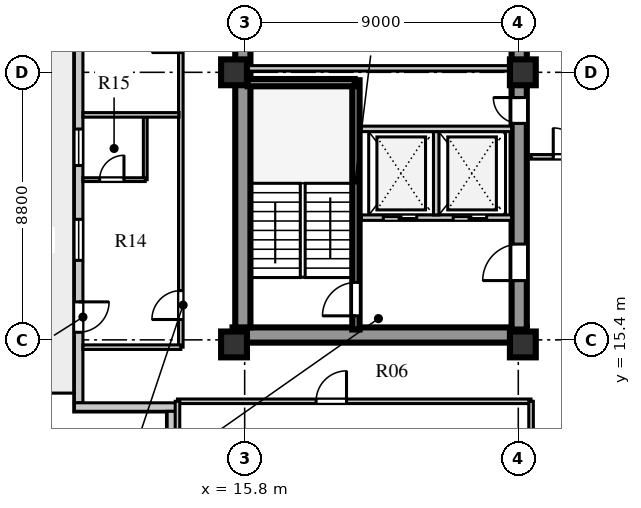
"""IFC4 building model, lengths in metres.
Left out: names, types, materials, properties, quantities, classifications, styles, units other than length and angle.
Written with IfcOpenShell. Run it as: python <this file> out.ifc"""

import sys

from ifc_helpers import new_model, si_unit, direction, frame, frame_2d, origin, origin_2d, place, context, subcontext, project, spatial, rectangle, extrude, element, fill, save


model = new_model("IFC4")
c1 = context("Model", 3, precision=1e-05, world=origin(), true_north=direction((0.0, 1.0)))
c2 = subcontext(c1, "Body", "Model", "MODEL_VIEW")
j1 = project(units=[si_unit("LENGTHUNIT", "METRE"), si_unit("PLANEANGLEUNIT", "RADIAN")], contexts=[c1])
p1 = place(None, origin())
s1 = spatial("IfcSite", under=j1, at=p1, CompositionType="ELEMENT")
p2 = place(p1, origin())
s2 = spatial("IfcBuilding", under=s1, at=p2, CompositionType="ELEMENT")
p3 = place(p2, frame((0.0, 0.0, 127.1)))
s3 = spatial("IfcBuildingStorey", under=s2, at=p3, CompositionType="ELEMENT", Elevation=127.1)
p4 = place(p3, frame((15.4, 15.56, 0.0), z_axis=(0.0, 0.0, 1.0), x_axis=(1.0, 0.0, 0.0)))
e1 = element("IfcWall", 1, at=p4, inside=s3, PredefinedType="SHEAR", context=c2, shape_type="SweptSolid", body=[
    extrude(rectangle(XDim=9.68, YDim=0.5, at=frame_2d((4.84, 0.0))), origin(), (0.0, 0.0, 1.0), 3.6),
])
p5 = place(p3, frame((15.74, 15.81, 0.0), z_axis=(0.0, 0.0, 1.0), x_axis=(0.0, 1.0, 0.0)))
e2 = element("IfcWall", 2, at=p5, inside=s3, PredefinedType="SHEAR", context=c2, shape_type="SweptSolid", body=[
    extrude(rectangle(XDim=25.63, YDim=0.5, at=frame_2d((12.815, 0.0))), origin(), (0.0, 0.0, 1.0), 3.6),
])
p6 = place(p3, frame((24.83, 15.74, 0.0), z_axis=(0.0, 0.0, 1.0), x_axis=(0.0, 1.0, 0.0)))
e3 = element("IfcWall", 3, at=p6, inside=s3, PredefinedType="SHEAR", context=c2, shape_type="SweptSolid", body=[
    extrude(rectangle(XDim=25.76, YDim=0.5, at=frame_2d((12.88, 0.0))), origin(), (0.0, 0.0, 1.0), 3.6),
])
p7 = place(p6, frame((1.61, 0.0, 0.0)))
e4 = element("IfcOpeningElement", 4, at=p7, cuts=e3, PredefinedType="OPENING", context=c2, shape_type="SweptSolid", body=[
    extrude(rectangle(XDim=1.2, YDim=2.1, at=frame_2d((0.6, 1.05))), frame((0.0, 0.26, 0.0), z_axis=(0.0, -1.0, 0.0), x_axis=(1.0, 0.0, 0.0)), (0.0, 0.0, 1.0), 0.52),
])
p8 = place(p6, frame((6.78, 0.0, 0.0)))
e5 = element("IfcOpeningElement", 5, at=p8, cuts=e3, PredefinedType="OPENING", context=c2, shape_type="SweptSolid", body=[
    extrude(rectangle(XDim=0.85, YDim=2.06, at=frame_2d((0.425, 1.03))), frame((0.0, 0.26, 0.0), z_axis=(0.0, -1.0, 0.0), x_axis=(1.0, 0.0, 0.0)), (0.0, 0.0, 1.0), 0.52),
])
p9 = place(p6, frame((12.11, 0.0, 0.0)))
e6 = element("IfcOpeningElement", 6, at=p9, cuts=e3, PredefinedType="OPENING", context=c2, shape_type="SweptSolid", body=[
    extrude(rectangle(XDim=1.5, YDim=2.12, at=frame_2d((0.75, 1.06))), frame((0.0, 0.26, 0.0), z_axis=(0.0, -1.0, 0.0), x_axis=(1.0, 0.0, 0.0)), (0.0, 0.0, 1.0), 0.52),
])
p10 = place(p6, frame((20.11, 0.0, 0.0)))
e7 = element("IfcOpeningElement", 7, at=p10, cuts=e3, PredefinedType="OPENING", context=c2, shape_type="SweptSolid", body=[
    extrude(rectangle(XDim=1.2, YDim=2.12, at=frame_2d((0.6, 1.06))), frame((0.0, 0.26, 0.0), z_axis=(0.0, -1.0, 0.0), x_axis=(1.0, 0.0, 0.0)), (0.0, 0.0, 1.0), 0.52),
])
p11 = place(p6, frame((24.01, 0.0, 0.0)))
e8 = element("IfcOpeningElement", 8, at=p11, cuts=e3, PredefinedType="OPENING", context=c2, shape_type="SweptSolid", body=[
    extrude(rectangle(XDim=0.95, YDim=2.1, at=frame_2d((0.475, 1.05))), frame((0.0, 0.26, 0.0), z_axis=(0.0, -1.0, 0.0), x_axis=(1.0, 0.0, 0.0)), (0.0, 0.0, 1.0), 0.52),
])
for number, where, z_axis, x_axis in (
    (9, (15.45, 15.25, 0.0), (0.0, 0.0, 1.0), (1.0, 0.0, 0.0)),
    (10, (15.45, 24.2, 0.0), (0.0, 0.0, 1.0), (1.0, 0.0, 0.0)),
    (11, (24.95, 15.25, 0.0), (0.0, 0.0, 1.0), (1.0, 0.0, 0.0)),
    (12, (24.95, 24.2, 0.0), (0.0, 0.0, 1.0), (1.0, 0.0, 0.0)),
):
    element("IfcColumn", number, at=place(p3, frame(where, z_axis=z_axis, x_axis=x_axis)), inside=s3, PredefinedType="COLUMN", context=c2, shape_type="SweptSolid", body=[
        extrude(rectangle(XDim=0.85, YDim=0.85, at=origin_2d()), origin(), (0.0, 0.0, 1.0), 3.6),
    ])
p12 = place(p3, frame((10.34, 43.87, 0.0), z_axis=(0.0, 0.0, 1.0), x_axis=(0.0, -1.0, 0.0)))
e13 = element("IfcWall", 13, at=p12, inside=s3, PredefinedType="STANDARD", context=c2, shape_type="SweptSolid", body=[
    extrude(rectangle(XDim=30.54, YDim=0.28, at=frame_2d((15.27, 0.0))), origin(), (0.0, 0.0, 1.0), 3.6),
])
p13 = place(p12, frame((27.22, 0.0, 0.0)))
e14 = element("IfcOpeningElement", 14, at=p13, cuts=e13, PredefinedType="OPENING", context=c2, shape_type="SweptSolid", body=[
    extrude(rectangle(XDim=1.0, YDim=2.05, at=frame_2d((0.5, 1.025))), frame((0.0, 0.15, 0.0), z_axis=(0.0, -1.0, 0.0), x_axis=(1.0, 0.0, 0.0)), (0.0, 0.0, 1.0), 0.3),
])
p14 = place(p12, frame((24.505, 0.0, 0.8)))
e15 = element("IfcOpeningElement", 15, at=p14, cuts=e13, PredefinedType="OPENING", context=c2, shape_type="SweptSolid", body=[
    extrude(rectangle(XDim=1.35, YDim=1.9, at=frame_2d((0.675, 0.95))), frame((0.0, 0.15, 0.0), z_axis=(0.0, -1.0, 0.0), x_axis=(1.0, 0.0, 0.0)), (0.0, 0.0, 1.0), 0.3),
])
p15 = place(p12, frame((21.535, 0.0, 0.8)))
e16 = element("IfcOpeningElement", 16, at=p15, cuts=e13, PredefinedType="OPENING", context=c2, shape_type="SweptSolid", body=[
    extrude(rectangle(XDim=1.2, YDim=1.75, at=frame_2d((0.6, 0.875))), frame((0.0, 0.15, 0.0), z_axis=(0.0, -1.0, 0.0), x_axis=(1.0, 0.0, 0.0)), (0.0, 0.0, 1.0), 0.3),
])
p16 = place(p12, frame((16.16, 0.0, 0.8)))
e17 = element("IfcOpeningElement", 17, at=p16, cuts=e13, PredefinedType="OPENING", context=c2, shape_type="SweptSolid", body=[
    extrude(rectangle(XDim=1.95, YDim=2.0, at=frame_2d((0.975, 1.0))), frame((0.0, 0.15, 0.0), z_axis=(0.0, -1.0, 0.0), x_axis=(1.0, 0.0, 0.0)), (0.0, 0.0, 1.0), 0.3),
])
p17 = place(p12, frame((11.535, 0.0, 0.8)))
e18 = element("IfcOpeningElement", 18, at=p17, cuts=e13, PredefinedType="OPENING", context=c2, shape_type="SweptSolid", body=[
    extrude(rectangle(XDim=1.2, YDim=1.75, at=frame_2d((0.6, 0.875))), frame((0.0, 0.15, 0.0), z_axis=(0.0, -1.0, 0.0), x_axis=(1.0, 0.0, 0.0)), (0.0, 0.0, 1.0), 0.3),
])
p18 = place(p12, frame((6.645, 0.0, 0.8)))
e19 = element("IfcOpeningElement", 19, at=p18, cuts=e13, PredefinedType="OPENING", context=c2, shape_type="SweptSolid", body=[
    extrude(rectangle(XDim=1.8, YDim=2.0, at=frame_2d((0.9, 1.0))), frame((0.0, 0.15, 0.0), z_axis=(0.0, -1.0, 0.0), x_axis=(1.0, 0.0, 0.0)), (0.0, 0.0, 1.0), 0.3),
])
p19 = place(p12, frame((2.325, 0.0, 0.8)))
e20 = element("IfcOpeningElement", 20, at=p19, cuts=e13, PredefinedType="OPENING", context=c2, shape_type="SweptSolid", body=[
    extrude(rectangle(XDim=1.2, YDim=1.75, at=frame_2d((0.6, 0.875))), frame((0.0, 0.15, 0.0), z_axis=(0.0, -1.0, 0.0), x_axis=(1.0, 0.0, 0.0)), (0.0, 0.0, 1.0), 0.3),
])
p20 = place(p3, frame((10.2, 13.19, 0.0), z_axis=(0.0, 0.0, 1.0), x_axis=(1.0, 0.0, 0.0)))
e21 = element("IfcWall", 21, at=p20, inside=s3, PredefinedType="STANDARD", context=c2, shape_type="SweptSolid", body=[
    extrude(rectangle(XDim=3.33, YDim=0.28, at=frame_2d((1.665, 0.0))), origin(), (0.0, 0.0, 1.0), 3.6),
])
p21 = place(p3, frame((13.39, 13.05, 0.0), z_axis=(0.0, 0.0, 1.0), x_axis=(0.0, -1.0, 0.0)))
e22 = element("IfcWall", 22, at=p21, inside=s3, PredefinedType="STANDARD", context=c2, shape_type="SweptSolid", body=[
    extrude(rectangle(XDim=2.77, YDim=0.28, at=frame_2d((1.385, 0.0))), origin(), (0.0, 0.0, 1.0), 3.6),
])
p22 = place(p3, frame((19.46, 15.74, 0.0), z_axis=(0.0, 0.0, 1.0), x_axis=(0.0, 1.0, 0.0)))
e23 = element("IfcWall", 23, at=p22, inside=s3, PredefinedType="SHEAR", context=c2, shape_type="SweptSolid", body=[
    extrude(rectangle(XDim=8.2, YDim=0.24, at=frame_2d((4.1, 0.0))), origin(), (0.0, 0.0, 1.0), 3.85),
])
p23 = place(p22, frame((0.45, 0.0, 0.0)))
e24 = element("IfcOpeningElement", 24, at=p23, cuts=e23, PredefinedType="OPENING", context=c2, shape_type="SweptSolid", body=[
    extrude(rectangle(XDim=1.1, YDim=2.1, at=frame_2d((0.55, 1.05))), frame((0.0, 0.13, 0.0), z_axis=(0.0, -1.0, 0.0), x_axis=(1.0, 0.0, 0.0)), (0.0, 0.0, 1.0), 0.26),
])
p24 = place(p3, frame((15.9, 23.86, 0.0), z_axis=(0.0, 0.0, 1.0), x_axis=(1.0, 0.0, 0.0)))
e25 = element("IfcWall", 25, at=p24, inside=s3, PredefinedType="SHEAR", context=c2, shape_type="SweptSolid", body=[
    extrude(rectangle(XDim=3.52, YDim=0.24, at=frame_2d((1.76, 0.0))), origin(), (0.0, 0.0, 1.0), 3.85),
])
p25 = place(p3, frame((19.64, 19.42, 0.0), z_axis=(0.0, 0.0, 1.0), x_axis=(1.0, 0.0, 0.0)))
e26 = element("IfcWall", 26, at=p25, inside=s3, PredefinedType="SOLIDWALL", context=c2, shape_type="SweptSolid", body=[
    extrude(rectangle(XDim=4.94, YDim=0.18, at=frame_2d((2.47, 0.0))), origin(), (0.0, 0.0, 1.0), 3.6),
])
p26 = place(p25, frame((0.72, 0.0, 0.0)))
e27 = element("IfcOpeningElement", 27, at=p26, cuts=e26, PredefinedType="OPENING", context=c2, shape_type="SweptSolid", body=[
    extrude(rectangle(XDim=1.1, YDim=2.1, at=frame_2d((0.55, 1.05))), frame((0.0, 0.1, 0.0), z_axis=(0.0, -1.0, 0.0), x_axis=(1.0, 0.0, 0.0)), (0.0, 0.0, 1.0), 0.2),
])
p27 = place(p25, frame((3.02, 0.0, 0.0)))
e28 = element("IfcOpeningElement", 28, at=p27, cuts=e26, PredefinedType="OPENING", context=c2, shape_type="SweptSolid", body=[
    extrude(rectangle(XDim=1.1, YDim=2.1, at=frame_2d((0.55, 1.05))), frame((0.0, 0.1, 0.0), z_axis=(0.0, -1.0, 0.0), x_axis=(1.0, 0.0, 0.0)), (0.0, 0.0, 1.0), 0.2),
])
p28 = place(p3, frame((22.1, 19.51, 0.0), z_axis=(0.0, 0.0, 1.0), x_axis=(0.0, 1.0, 0.0)))
e29 = element("IfcWall", 29, at=p28, inside=s3, PredefinedType="SOLIDWALL", context=c2, shape_type="SweptSolid", body=[
    extrude(rectangle(XDim=2.74, YDim=0.18, at=frame_2d((1.37, 0.0))), origin(), (0.0, 0.0, 1.0), 3.6),
])
p29 = place(p3, frame((19.64, 22.34, 0.0), z_axis=(0.0, 0.0, 1.0), x_axis=(1.0, 0.0, 0.0)))
e30 = element("IfcWall", 30, at=p29, inside=s3, PredefinedType="SOLIDWALL", context=c2, shape_type="SweptSolid", body=[
    extrude(rectangle(XDim=4.94, YDim=0.18, at=frame_2d((2.47, 0.0))), origin(), (0.0, 0.0, 1.0), 3.6),
])
p30 = place(p3, frame((15.9, 24.33, 0.0), z_axis=(0.0, 0.0, 1.0), x_axis=(1.0, 0.0, 0.0)))
e31 = element("IfcWall", 31, at=p30, inside=s3, PredefinedType="SOLIDWALL", context=c2, shape_type="SweptSolid", body=[
    extrude(rectangle(XDim=8.68, YDim=0.18, at=frame_2d((4.34, 0.0))), origin(), (0.0, 0.0, 1.0), 2.95),
])
p31 = place(p3, frame((25.22, 21.42, 0.0), z_axis=(0.0, 0.0, 1.0), x_axis=(1.0, 0.0, 0.0)))
e32 = element("IfcWall", 32, at=p31, inside=s3, PredefinedType="PARTITIONING", context=c2, shape_type="SweptSolid", body=[
    extrude(rectangle(XDim=15.6, YDim=0.15, at=frame_2d((7.8, 0.0))), origin(), (0.0, 0.0, 1.0), 3.2),
])
p32 = place(p31, frame((0.73, 0.0, 0.0)))
e33 = element("IfcOpeningElement", 33, at=p32, cuts=e32, PredefinedType="OPENING", context=c2, shape_type="SweptSolid", body=[
    extrude(rectangle(XDim=0.95, YDim=2.1, at=frame_2d((0.475, 1.05))), frame((0.0, 0.085, 0.0), z_axis=(0.0, -1.0, 0.0), x_axis=(1.0, 0.0, 0.0)), (0.0, 0.0, 1.0), 0.17),
])
p33 = place(p31, frame((5.23, 0.0, 0.0)))
e34 = element("IfcOpeningElement", 34, at=p33, cuts=e32, PredefinedType="OPENING", context=c2, shape_type="SweptSolid", body=[
    extrude(rectangle(XDim=0.95, YDim=2.1, at=frame_2d((0.475, 1.05))), frame((0.0, 0.085, 0.0), z_axis=(0.0, -1.0, 0.0), x_axis=(1.0, 0.0, 0.0)), (0.0, 0.0, 1.0), 0.17),
])
p34 = place(p31, frame((10.83, 0.0, 0.0)))
e35 = element("IfcOpeningElement", 35, at=p34, cuts=e32, PredefinedType="OPENING", context=c2, shape_type="SweptSolid", body=[
    extrude(rectangle(XDim=0.95, YDim=2.1, at=frame_2d((0.475, 1.05))), frame((0.0, 0.085, 0.0), z_axis=(0.0, -1.0, 0.0), x_axis=(1.0, 0.0, 0.0)), (0.0, 0.0, 1.0), 0.17),
])
p35 = place(p3, frame((13.7, 15.16, 0.0), z_axis=(0.0, 0.0, 1.0), x_axis=(0.0, 1.0, 0.0)))
e36 = element("IfcWall", 36, at=p35, inside=s3, PredefinedType="PARTITIONING", context=c2, shape_type="SweptSolid", body=[
    extrude(rectangle(XDim=26.88, YDim=0.15, at=frame_2d((13.44, 0.0))), origin(), (0.0, 0.0, 1.0), 3.6),
])
p36 = place(p35, frame((0.91, 0.0, 0.0)))
e37 = element("IfcOpeningElement", 37, at=p36, cuts=e36, PredefinedType="OPENING", context=c2, shape_type="SweptSolid", body=[
    extrude(rectangle(XDim=0.95, YDim=2.1, at=frame_2d((0.475, 1.05))), frame((0.0, 0.085, 0.0), z_axis=(0.0, -1.0, 0.0), x_axis=(1.0, 0.0, 0.0)), (0.0, 0.0, 1.0), 0.17),
])
p37 = place(p35, frame((9.69, 0.0, 0.0)))
e38 = element("IfcOpeningElement", 38, at=p37, cuts=e36, PredefinedType="OPENING", context=c2, shape_type="SweptSolid", body=[
    extrude(rectangle(XDim=0.95, YDim=2.1, at=frame_2d((0.475, 1.05))), frame((0.0, 0.085, 0.0), z_axis=(0.0, -1.0, 0.0), x_axis=(1.0, 0.0, 0.0)), (0.0, 0.0, 1.0), 0.17),
])
p38 = place(p35, frame((18.49, 0.0, 0.0)))
e39 = element("IfcOpeningElement", 39, at=p38, cuts=e36, PredefinedType="OPENING", context=c2, shape_type="SweptSolid", body=[
    extrude(rectangle(XDim=0.95, YDim=2.1, at=frame_2d((0.475, 1.05))), frame((0.0, 0.085, 0.0), z_axis=(0.0, -1.0, 0.0), x_axis=(1.0, 0.0, 0.0)), (0.0, 0.0, 1.0), 0.17),
])
p39 = place(p3, frame((10.48, 15.16, 0.0), z_axis=(0.0, 0.0, 1.0), x_axis=(1.0, 0.0, 0.0)))
e40 = element("IfcWall", 40, at=p39, inside=s3, PredefinedType="PARTITIONING", context=c2, shape_type="SweptSolid", body=[
    extrude(rectangle(XDim=3.22, YDim=0.15, at=frame_2d((1.61, 0.0))), origin(), (0.0, 0.0, 1.0), 3.1),
])
p40 = place(p3, frame((13.59, 13.38, 0.0), z_axis=(0.0, 0.0, 1.0), x_axis=(1.0, 0.0, 0.0)))
e41 = element("IfcWall", 41, at=p40, inside=s3, PredefinedType="PARTITIONING", context=c2, shape_type="SweptSolid", body=[
    extrude(rectangle(XDim=11.63, YDim=0.15, at=frame_2d((5.815, 0.0))), origin(), (0.0, 0.0, 1.0), 3.6),
])
p41 = place(p40, frame((4.56, 0.0, 0.0)))
e42 = element("IfcOpeningElement", 42, at=p41, cuts=e41, PredefinedType="OPENING", context=c2, shape_type="SweptSolid", body=[
    extrude(rectangle(XDim=1.0, YDim=2.08, at=frame_2d((0.5, 1.04))), frame((0.0, 0.085, 0.0), z_axis=(0.0, -1.0, 0.0), x_axis=(1.0, 0.0, 0.0)), (0.0, 0.0, 1.0), 0.17),
])
p42 = place(p3, frame((13.59, 10.28, 0.0), z_axis=(0.0, 0.0, 1.0), x_axis=(0.0, 1.0, 0.0)))
e43 = element("IfcWall", 43, at=p42, inside=s3, PredefinedType="PARTITIONING", context=c2, shape_type="SweptSolid", body=[
    extrude(rectangle(XDim=3.1, YDim=0.15, at=frame_2d((1.55, 0.0))), origin(), (0.0, 0.0, 1.0), 3.6),
])
p43 = place(p3, frame((25.22, 10.28, 0.0), z_axis=(0.0, 0.0, 1.0), x_axis=(0.0, 1.0, 0.0)))
e44 = element("IfcWall", 44, at=p43, inside=s3, PredefinedType="PARTITIONING", context=c2, shape_type="SweptSolid", body=[
    extrude(rectangle(XDim=3.1, YDim=0.15, at=frame_2d((1.55, 0.0))), origin(), (0.0, 0.0, 1.0), 3.1),
])
p44 = place(p3, frame((12.53, 20.67, 0.0), z_axis=(0.0, 0.0, 1.0), x_axis=(0.0, 1.0, 0.0)))
e45 = element("IfcWall", 45, at=p44, inside=s3, PredefinedType="PLUMBINGWALL", context=c2, shape_type="SweptSolid", body=[
    extrude(rectangle(XDim=2.05, YDim=0.125, at=frame_2d((1.025, 0.0))), origin(), (0.0, 0.0, 1.0), 3.6),
])
p45 = place(p3, frame((10.48, 20.67, 0.0), z_axis=(0.0, 0.0, 1.0), x_axis=(1.0, 0.0, 0.0)))
e46 = element("IfcWall", 46, at=p45, inside=s3, PredefinedType="PLUMBINGWALL", context=c2, shape_type="SweptSolid", body=[
    extrude(rectangle(XDim=2.05, YDim=0.125, at=frame_2d((1.025, 0.0))), origin(), (0.0, 0.0, 1.0), 3.6),
])
p46 = place(p45, frame((0.55, 0.0, 0.0)))
e47 = element("IfcOpeningElement", 47, at=p46, cuts=e46, PredefinedType="OPENING", context=c2, shape_type="SweptSolid", body=[
    extrude(rectangle(XDim=0.8, YDim=2.05, at=frame_2d((0.4, 1.025))), frame((0.0, 0.073, 0.0), z_axis=(0.0, -1.0, 0.0), x_axis=(1.0, 0.0, 0.0)), (0.0, 0.0, 1.0), 0.145),
])
p47 = place(p3, frame((10.48, 22.8, 0.0), z_axis=(0.0, 0.0, 1.0), x_axis=(1.0, 0.0, 0.0)))
e48 = element("IfcWall", 48, at=p47, inside=s3, PredefinedType="PARTITIONING", context=c2, shape_type="SweptSolid", body=[
    extrude(rectangle(XDim=3.16, YDim=0.15, at=frame_2d((1.58, 0.0))), origin(), (0.0, 0.0, 1.0), 3.6),
])
p48 = place(p13, frame((1.0, 0.0, 0.0), z_axis=(0.0, 0.0, 1.0), x_axis=(-1.0, 0.0, 0.0)))
e49 = element("IfcDoor", 49, at=p48, inside=s3, OperationType="SINGLE_SWING_RIGHT", PredefinedType="DOOR", context=c2, shape_type="SweptSolid", body=[
    extrude(rectangle(XDim=1.0, YDim=2.05, at=frame_2d((0.5, 1.025))), frame((0.0, 0.025, 0.0), z_axis=(0.0, -1.0, 0.0), x_axis=(1.0, 0.0, 0.0)), (0.0, 0.0, 1.0), 0.05),
])
fill(e14, e49)
p49 = place(p14, origin())
e50 = element("IfcWindow", 50, at=p49, inside=s3, PartitioningType="SINGLE_PANEL", PredefinedType="WINDOW", context=c2, shape_type="SweptSolid", body=[
    extrude(rectangle(XDim=1.35, YDim=1.9, at=frame_2d((0.675, 0.95))), frame((0.0, 0.03, 0.0), z_axis=(0.0, -1.0, 0.0), x_axis=(1.0, 0.0, 0.0)), (0.0, 0.0, 1.0), 0.06),
])
fill(e15, e50)
p50 = place(p15, origin())
e51 = element("IfcWindow", 51, at=p50, inside=s3, PartitioningType="SINGLE_PANEL", PredefinedType="WINDOW", context=c2, shape_type="SweptSolid", body=[
    extrude(rectangle(XDim=1.2, YDim=1.75, at=frame_2d((0.6, 0.875))), frame((0.0, 0.03, 0.0), z_axis=(0.0, -1.0, 0.0), x_axis=(1.0, 0.0, 0.0)), (0.0, 0.0, 1.0), 0.06),
])
fill(e16, e51)
p51 = place(p23, origin())
e52 = element("IfcDoor", 52, at=p51, inside=s3, OperationType="SINGLE_SWING_LEFT", PredefinedType="DOOR", context=c2, shape_type="SweptSolid", body=[
    extrude(rectangle(XDim=1.1, YDim=2.1, at=frame_2d((0.55, 1.05))), frame((0.0, 0.025, 0.0), z_axis=(0.0, -1.0, 0.0), x_axis=(1.0, 0.0, 0.0)), (0.0, 0.0, 1.0), 0.05),
])
fill(e24, e52)
p52 = place(p26, origin())
e53 = element("IfcDoor", 53, at=p52, inside=s3, OperationType="DOUBLE_DOOR_SLIDING", PredefinedType="DOOR", context=c2, shape_type="SweptSolid", body=[
    extrude(rectangle(XDim=1.1, YDim=2.1, at=frame_2d((0.55, 1.05))), frame((0.0, 0.025, 0.0), z_axis=(0.0, -1.0, 0.0), x_axis=(1.0, 0.0, 0.0)), (0.0, 0.0, 1.0), 0.05),
])
fill(e27, e53)
p53 = place(p27, origin())
e54 = element("IfcDoor", 54, at=p53, inside=s3, OperationType="DOUBLE_DOOR_SLIDING", PredefinedType="DOOR", context=c2, shape_type="SweptSolid", body=[
    extrude(rectangle(XDim=1.1, YDim=2.1, at=frame_2d((0.55, 1.05))), frame((0.0, 0.025, 0.0), z_axis=(0.0, -1.0, 0.0), x_axis=(1.0, 0.0, 0.0)), (0.0, 0.0, 1.0), 0.05),
])
fill(e28, e54)
p54 = place(p7, frame((1.2, 0.0, 0.0), z_axis=(0.0, 0.0, 1.0), x_axis=(-1.0, 0.0, 0.0)))
e55 = element("IfcDoor", 55, at=p54, inside=s3, OperationType="SINGLE_SWING_RIGHT", PredefinedType="DOOR", context=c2, shape_type="SweptSolid", body=[
    extrude(rectangle(XDim=1.2, YDim=2.1, at=frame_2d((0.6, 1.05))), frame((0.0, 0.025, 0.0), z_axis=(0.0, -1.0, 0.0), x_axis=(1.0, 0.0, 0.0)), (0.0, 0.0, 1.0), 0.05),
])
fill(e4, e55)
p55 = place(p8, frame((0.85, 0.0, 0.0), z_axis=(0.0, 0.0, 1.0), x_axis=(-1.0, 0.0, 0.0)))
e56 = element("IfcDoor", 56, at=p55, inside=s3, OperationType="SINGLE_SWING_LEFT", PredefinedType="DOOR", context=c2, shape_type="SweptSolid", body=[
    extrude(rectangle(XDim=0.85, YDim=2.06, at=frame_2d((0.425, 1.03))), frame((0.0, 0.025, 0.0), z_axis=(0.0, -1.0, 0.0), x_axis=(1.0, 0.0, 0.0)), (0.0, 0.0, 1.0), 0.05),
])
fill(e5, e56)
p56 = place(p41, frame((1.0, 0.0, 0.0), z_axis=(0.0, 0.0, 1.0), x_axis=(-1.0, 0.0, 0.0)))
e57 = element("IfcDoor", 57, at=p56, inside=s3, OperationType="SINGLE_SWING_LEFT", PredefinedType="DOOR", context=c2, shape_type="SweptSolid", body=[
    extrude(rectangle(XDim=1.0, YDim=2.08, at=frame_2d((0.5, 1.04))), frame((0.0, 0.025, 0.0), z_axis=(0.0, -1.0, 0.0), x_axis=(1.0, 0.0, 0.0)), (0.0, 0.0, 1.0), 0.05),
])
fill(e42, e57)
p57 = place(p36, origin())
e58 = element("IfcDoor", 58, at=p57, inside=s3, OperationType="SINGLE_SWING_LEFT", PredefinedType="DOOR", context=c2, shape_type="SweptSolid", body=[
    extrude(rectangle(XDim=0.95, YDim=2.1, at=frame_2d((0.475, 1.05))), frame((0.0, 0.025, 0.0), z_axis=(0.0, -1.0, 0.0), x_axis=(1.0, 0.0, 0.0)), (0.0, 0.0, 1.0), 0.05),
])
fill(e37, e58)
p58 = place(p46, frame((0.8, 0.0, 0.0), z_axis=(0.0, 0.0, 1.0), x_axis=(-1.0, 0.0, 0.0)))
e59 = element("IfcDoor", 59, at=p58, inside=s3, OperationType="SINGLE_SWING_LEFT", PredefinedType="DOOR", context=c2, shape_type="SweptSolid", body=[
    extrude(rectangle(XDim=0.8, YDim=2.05, at=frame_2d((0.4, 1.025))), frame((0.0, 0.025, 0.0), z_axis=(0.0, -1.0, 0.0), x_axis=(1.0, 0.0, 0.0)), (0.0, 0.0, 1.0), 0.05),
])
fill(e47, e59)
p59 = place(p37, origin())
e60 = element("IfcDoor", 60, at=p59, inside=s3, OperationType="SINGLE_SWING_LEFT", PredefinedType="DOOR", context=c2, shape_type="SweptSolid", body=[
    extrude(rectangle(XDim=0.95, YDim=2.1, at=frame_2d((0.475, 1.05))), frame((0.0, 0.025, 0.0), z_axis=(0.0, -1.0, 0.0), x_axis=(1.0, 0.0, 0.0)), (0.0, 0.0, 1.0), 0.05),
])
fill(e38, e60)
p60 = place(p32, frame((0.95, 0.0, 0.0), z_axis=(0.0, 0.0, 1.0), x_axis=(-1.0, 0.0, 0.0)))
e61 = element("IfcDoor", 61, at=p60, inside=s3, OperationType="SINGLE_SWING_RIGHT", PredefinedType="DOOR", context=c2, shape_type="SweptSolid", body=[
    extrude(rectangle(XDim=0.95, YDim=2.1, at=frame_2d((0.475, 1.05))), frame((0.0, 0.025, 0.0), z_axis=(0.0, -1.0, 0.0), x_axis=(1.0, 0.0, 0.0)), (0.0, 0.0, 1.0), 0.05),
])
fill(e33, e61)
save(model, sys.argv[1])
